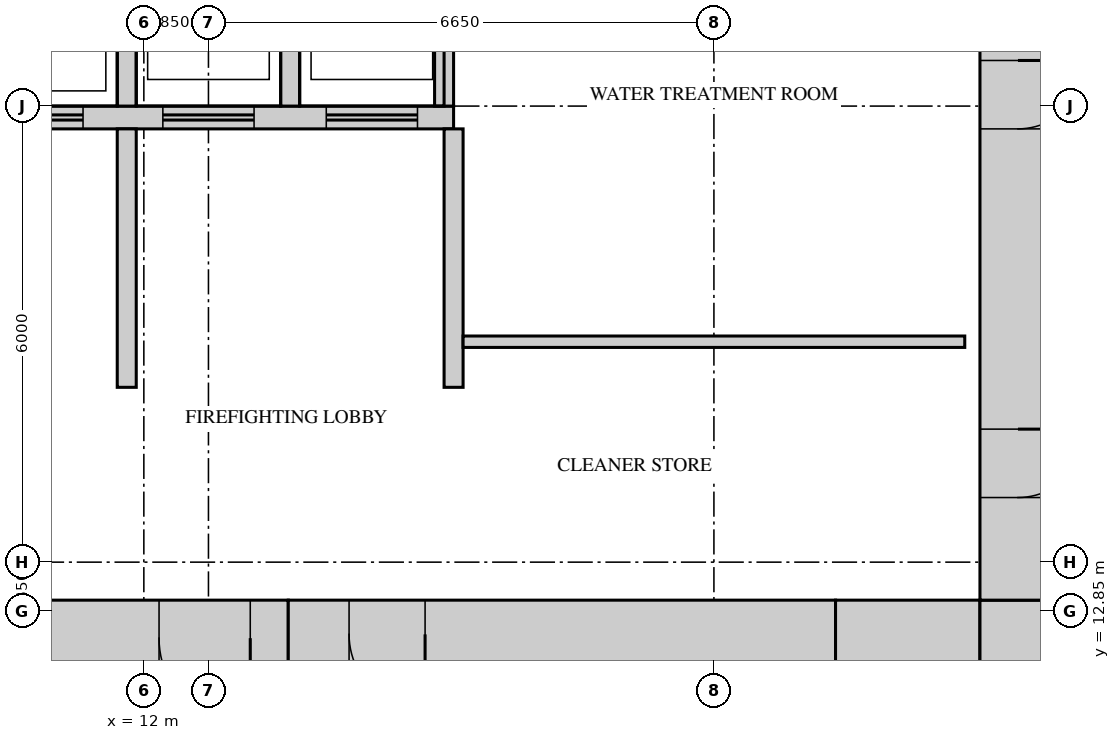
"""IFC4 building model, lengths in metres.
Left out: names, types, materials, properties, quantities, classifications, styles, units other than length and angle.
Written with IfcOpenShell. Run it as: python <this file> out.ifc"""

import sys

from ifc_helpers import new_model, si_unit, direction, frame, frame_2d, origin, place, context, subcontext, project, spatial, rectangle, extrude, source, transform, mapped, element, fill, save


model = new_model("IFC4")
c1 = context("Model", 3, precision=1e-05, world=origin(), true_north=direction((0.0, 1.0)))
c2 = subcontext(c1, "Body", "Model", "MODEL_VIEW")
j1 = project(units=[si_unit("LENGTHUNIT", "METRE"), si_unit("PLANEANGLEUNIT", "RADIAN")], contexts=[c1])
p1 = place(None, origin())
s1 = spatial("IfcSite", under=j1, at=p1, CompositionType="ELEMENT")
p2 = place(p1, origin())
s2 = spatial("IfcBuilding", under=s1, at=p2, CompositionType="ELEMENT")
p3 = place(p2, frame((0.0, 0.0, 154.3)))
s3 = spatial("IfcBuildingStorey", under=s2, at=p3, CompositionType="ELEMENT", Elevation=154.3)
m1 = source(origin(), c2, "Body", "SweptSolid", [
    extrude(rectangle(XDim=6.9, YDim=1.0, at=frame_2d((3.45, 0.0))), origin(), (0.0, 0.0, 1.0), 4.1),
])
p4 = place(p3, frame((7.0, 12.5, 0.0), z_axis=(0.0, 0.0, 1.0), x_axis=(1.0, 0.0, 0.0)))
e1 = element("IfcWall", 1, at=p4, inside=s3, PredefinedType="SHEAR", context=c2, shape_type="MappedRepresentation", body=[
    mapped(m1, transform((0.0, 0.0, 0.0))),
])
m2 = source(origin(), c2, "Body", "SweptSolid", [
    extrude(rectangle(XDim=1.2, YDim=2.1, at=frame_2d((0.6, 1.05))), frame((0.0, 0.51, 0.0), z_axis=(0.0, -1.0, 0.0), x_axis=(1.0, 0.0, 0.0)), (0.0, 0.0, 1.0), 1.02),
])
p5 = place(p4, frame((5.2, 0.0, 0.0)))
e2 = element("IfcOpeningElement", 2, at=p5, cuts=e1, PredefinedType="OPENING", context=c2, shape_type="MappedRepresentation", body=[
    mapped(m2, transform((0.0, 0.0, 0.0))),
])
p6 = place(p4, frame((1.85, 0.0, 0.0)))
e3 = element("IfcOpeningElement", 3, at=p6, cuts=e1, PredefinedType="OPENING", context=c2, shape_type="MappedRepresentation", body=[
    mapped(m2, transform((0.0, 0.0, 0.0))),
])
m3 = source(origin(), c2, "Body", "SweptSolid", [
    extrude(rectangle(XDim=7.2, YDim=0.9, at=frame_2d((3.6, 0.0))), origin(), (0.0, 0.0, 1.0), 4.1),
])
p7 = place(p3, frame((13.9, 12.55, 0.0), z_axis=(0.0, 0.0, 1.0), x_axis=(1.0, 0.0, 0.0)))
e4 = element("IfcWall", 4, at=p7, inside=s3, PredefinedType="SHEAR", context=c2, shape_type="MappedRepresentation", body=[
    mapped(m3, transform((0.0, 0.0, 0.0))),
])
m4 = source(origin(), c2, "Body", "SweptSolid", [
    extrude(rectangle(XDim=1.0, YDim=2.1, at=frame_2d((0.5, 1.05))), frame((0.0, 0.46, 0.0), z_axis=(0.0, -1.0, 0.0), x_axis=(1.0, 0.0, 0.0)), (0.0, 0.0, 1.0), 0.92),
])
p8 = place(p7, frame((0.8, 0.0, 0.0)))
e5 = element("IfcOpeningElement", 5, at=p8, cuts=e4, PredefinedType="OPENING", context=c2, shape_type="MappedRepresentation", body=[
    mapped(m4, transform((0.0, 0.0, 0.0))),
])
m5 = source(origin(), c2, "Body", "SweptSolid", [
    extrude(rectangle(XDim=1.9, YDim=1.0, at=frame_2d((0.95, 0.0))), origin(), (0.0, 0.0, 1.0), 4.1),
])
p9 = place(p3, frame((21.1, 12.5, 0.0), z_axis=(0.0, 0.0, 1.0), x_axis=(1.0, 0.0, 0.0)))
e6 = element("IfcWall", 6, at=p9, inside=s3, PredefinedType="SHEAR", context=c2, shape_type="MappedRepresentation", body=[
    mapped(m5, transform((0.0, 0.0, 0.0))),
])
m6 = source(origin(), c2, "Body", "SweptSolid", [
    extrude(rectangle(XDim=1.0, YDim=1.0, at=frame_2d((0.5, 0.0))), origin(), (0.0, 0.0, 1.0), 4.1),
])
p10 = place(p3, frame((23.0, 12.5, 0.0), z_axis=(0.0, 0.0, 1.0), x_axis=(1.0, 0.0, 0.0)))
e7 = element("IfcWall", 7, at=p10, inside=s3, PredefinedType="SHEAR", context=c2, shape_type="MappedRepresentation", body=[
    mapped(m6, transform((0.0, 0.0, 0.0))),
])
m7 = source(origin(), c2, "Body", "SweptSolid", [
    extrude(rectangle(XDim=28.0, YDim=1.0, at=frame_2d((14.0, 0.0))), origin(), (0.0, 0.0, 1.0), 4.1),
])
p11 = place(p3, frame((23.5, 13.0, 0.0), z_axis=(0.0, 0.0, 1.0), x_axis=(0.0, 1.0, 0.0)))
e8 = element("IfcWall", 8, at=p11, inside=s3, PredefinedType="SHEAR", context=c2, shape_type="MappedRepresentation", body=[
    mapped(m7, transform((0.0, 0.0, 0.0))),
])
m8 = source(origin(), c2, "Body", "SweptSolid", [
    extrude(rectangle(XDim=1.8, YDim=2.1, at=frame_2d((0.9, 1.05))), frame((0.0, 0.51, 0.0), z_axis=(0.0, -1.0, 0.0), x_axis=(1.0, 0.0, 0.0)), (0.0, 0.0, 1.0), 1.02),
])
p12 = place(p11, frame((22.6, 0.0, 0.0)))
e9 = element("IfcOpeningElement", 9, at=p12, cuts=e8, PredefinedType="OPENING", context=c2, shape_type="MappedRepresentation", body=[
    mapped(m8, transform((0.0, 0.0, 0.0))),
])
p13 = place(p11, frame((14.6, 0.0, 0.0)))
e10 = element("IfcOpeningElement", 10, at=p13, cuts=e8, PredefinedType="OPENING", context=c2, shape_type="MappedRepresentation", body=[
    mapped(m2, transform((0.0, 0.0, 0.0))),
])
m9 = source(origin(), c2, "Body", "SweptSolid", [
    extrude(rectangle(XDim=0.9, YDim=2.1, at=frame_2d((0.45, 1.05))), frame((0.0, 0.51, 0.0), z_axis=(0.0, -1.0, 0.0), x_axis=(1.0, 0.0, 0.0)), (0.0, 0.0, 1.0), 1.02),
])
p14 = place(p11, frame((1.35, 0.0, 0.0)))
e11 = element("IfcOpeningElement", 11, at=p14, cuts=e8, PredefinedType="OPENING", context=c2, shape_type="MappedRepresentation", body=[
    mapped(m9, transform((0.0, 0.0, 0.0))),
])
p15 = place(p11, frame((6.2, 0.0, 0.0)))
e12 = element("IfcOpeningElement", 12, at=p15, cuts=e8, PredefinedType="OPENING", context=c2, shape_type="MappedRepresentation", body=[
    mapped(m9, transform((0.0, 0.0, 0.0))),
])
m10 = source(origin(), c2, "Body", "SweptSolid", [
    extrude(rectangle(XDim=9.075, YDim=0.3, at=frame_2d((4.538, 0.0))), origin(), (0.0, 0.0, 1.0), 4.1),
])
p16 = place(p3, frame((7.0, 19.35, 0.0), z_axis=(0.0, 0.0, 1.0), x_axis=(1.0, 0.0, 0.0)))
e13 = element("IfcWall", 13, at=p16, inside=s3, PredefinedType="STANDARD", context=c2, shape_type="MappedRepresentation", body=[
    mapped(m10, transform((0.0, 0.0, 0.0))),
])
m11 = source(origin(), c2, "Body", "SweptSolid", [
    extrude(rectangle(XDim=1.2, YDim=2.1, at=frame_2d((0.6, 1.05))), frame((0.0, 0.16, 0.0), z_axis=(0.0, -1.0, 0.0), x_axis=(1.0, 0.0, 0.0)), (0.0, 0.0, 1.0), 0.32),
])
p17 = place(p16, frame((0.65, 0.0, 0.0)))
e14 = element("IfcOpeningElement", 14, at=p17, cuts=e13, PredefinedType="OPENING", context=c2, shape_type="MappedRepresentation", body=[
    mapped(m11, transform((0.0, 0.0, 0.0))),
])
p18 = place(p16, frame((3.0, 0.0, 0.0)))
e15 = element("IfcOpeningElement", 15, at=p18, cuts=e13, PredefinedType="OPENING", context=c2, shape_type="MappedRepresentation", body=[
    mapped(m11, transform((0.0, 0.0, 0.0))),
])
p19 = place(p16, frame((5.25, 0.0, 0.0)))
e16 = element("IfcOpeningElement", 16, at=p19, cuts=e13, PredefinedType="OPENING", context=c2, shape_type="MappedRepresentation", body=[
    mapped(m11, transform((0.0, 0.0, 0.0))),
])
p20 = place(p16, frame((7.4, 0.0, 0.0)))
e17 = element("IfcOpeningElement", 17, at=p20, cuts=e13, PredefinedType="OPENING", context=c2, shape_type="MappedRepresentation", body=[
    mapped(m11, transform((0.0, 0.0, 0.0))),
])
m12 = source(origin(), c2, "Body", "SweptSolid", [
    extrude(rectangle(XDim=3.1, YDim=0.25, at=frame_2d((1.55, 0.0))), origin(), (0.0, 0.0, 1.0), 4.1),
])
for number, where, z_axis, x_axis in (
    (18, (11.775, 19.5, 0.0), (0.0, 0.0, 1.0), (0.0, 1.0, 0.0)),
    (19, (13.925, 19.5, 0.0), (0.0, 0.0, 1.0), (0.0, 1.0, 0.0)),
    (20, (15.95, 19.5, 0.0), (0.0, 0.0, 1.0), (0.0, 1.0, 0.0)),
):
    element("IfcWall", number, at=place(p3, frame(where, z_axis=z_axis, x_axis=x_axis)), inside=s3, PredefinedType="STANDARD", context=c2, shape_type="MappedRepresentation", body=[
        mapped(m12, transform((0.0, 0.0, 0.0))),
    ])
m13 = source(origin(), c2, "Body", "SweptSolid", [
    extrude(rectangle(XDim=3.4, YDim=0.25, at=frame_2d((1.7, 0.0))), origin(), (0.0, 0.0, 1.0), 4.1),
])
for number, where, z_axis, x_axis in (
    (21, (16.075, 15.8, 0.0), (0.0, 0.0, 1.0), (0.0, 1.0, 0.0)),
    (22, (11.775, 15.8, 0.0), (0.0, 0.0, 1.0), (0.0, 1.0, 0.0)),
):
    element("IfcWall", number, at=place(p3, frame(where, z_axis=z_axis, x_axis=x_axis)), inside=s3, PredefinedType="STANDARD", context=c2, shape_type="MappedRepresentation", body=[
        mapped(m13, transform((0.0, 0.0, 0.0))),
    ])
m14 = source(origin(), c2, "Body", "SweptSolid", [
    extrude(rectangle(XDim=6.6, YDim=0.15, at=frame_2d((3.3, 0.0))), origin(), (0.0, 0.0, 1.0), 4.2),
])
p21 = place(p3, frame((16.2, 16.4, 0.0), z_axis=(0.0, 0.0, 1.0), x_axis=(1.0, 0.0, 0.0)))
e23 = element("IfcWall", 23, at=p21, inside=s3, PredefinedType="PARTITIONING", context=c2, shape_type="MappedRepresentation", body=[
    mapped(m14, transform((0.0, 0.0, 0.0))),
])
m15 = source(origin(), c2, "Body", "SweptSolid", [
    extrude(rectangle(XDim=0.9, YDim=2.1, at=frame_2d((0.45, 1.05))), frame((0.0, 0.45, 0.0), z_axis=(0.0, -1.0, 0.0), x_axis=(1.0, 0.0, 0.0)), (0.0, 0.0, 1.0), 0.9),
])
p22 = place(p14, origin())
e24 = element("IfcDoor", 24, at=p22, inside=s3, OperationType="SINGLE_SWING_RIGHT", PredefinedType="DOOR", context=c2, shape_type="MappedRepresentation", body=[
    mapped(m15, transform((0.0, 0.0, 0.0))),
])
fill(e11, e24)
p23 = place(p15, origin())
e25 = element("IfcDoor", 25, at=p23, inside=s3, OperationType="SINGLE_SWING_RIGHT", PredefinedType="DOOR", context=c2, shape_type="MappedRepresentation", body=[
    mapped(m15, transform((0.0, 0.0, 0.0))),
])
fill(e12, e25)
m16 = source(origin(), c2, "Body", "SweptSolid", [
    extrude(rectangle(XDim=1.2, YDim=2.1, at=frame_2d((0.6, 1.05))), frame((0.0, 0.45, 0.0), z_axis=(0.0, -1.0, 0.0), x_axis=(1.0, 0.0, 0.0)), (0.0, 0.0, 1.0), 0.9),
])
p24 = place(p5, origin())
e26 = element("IfcDoor", 26, at=p24, inside=s3, OperationType="SINGLE_SWING_RIGHT", PredefinedType="DOOR", context=c2, shape_type="MappedRepresentation", body=[
    mapped(m16, transform((0.0, 0.0, 0.0))),
])
fill(e2, e26)
m17 = source(origin(), c2, "Body", "SweptSolid", [
    extrude(rectangle(XDim=1.0, YDim=2.1, at=frame_2d((0.5, 1.05))), frame((0.0, 0.4, 0.0), z_axis=(0.0, -1.0, 0.0), x_axis=(1.0, 0.0, 0.0)), (0.0, 0.0, 1.0), 0.8),
])
p25 = place(p8, origin())
e27 = element("IfcDoor", 27, at=p25, inside=s3, OperationType="SINGLE_SWING_RIGHT", PredefinedType="DOOR", context=c2, shape_type="MappedRepresentation", body=[
    mapped(m17, transform((0.0, 0.0, 0.0))),
])
fill(e5, e27)
m18 = source(origin(), c2, "Body", "SweptSolid", [
    extrude(rectangle(XDim=1.2, YDim=2.1, at=frame_2d((0.6, 1.05))), frame((0.0, 0.025, 0.0), z_axis=(0.0, -1.0, 0.0), x_axis=(1.0, 0.0, 0.0)), (0.0, 0.0, 1.0), 0.05),
])
p26 = place(p18, origin())
e28 = element("IfcDoor", 28, at=p26, inside=s3, OperationType="DOUBLE_DOOR_SLIDING", PredefinedType="DOOR", context=c2, shape_type="MappedRepresentation", body=[
    mapped(m18, transform((0.0, 0.0, 0.0))),
])
fill(e15, e28)
p27 = place(p19, origin())
e29 = element("IfcDoor", 29, at=p27, inside=s3, OperationType="DOUBLE_DOOR_SLIDING", PredefinedType="DOOR", context=c2, shape_type="MappedRepresentation", body=[
    mapped(m18, transform((0.0, 0.0, 0.0))),
])
fill(e16, e29)
p28 = place(p20, origin())
e30 = element("IfcDoor", 30, at=p28, inside=s3, OperationType="DOUBLE_DOOR_SLIDING", PredefinedType="DOOR", context=c2, shape_type="MappedRepresentation", body=[
    mapped(m18, transform((0.0, 0.0, 0.0))),
])
fill(e17, e30)
save(model, sys.argv[1])
